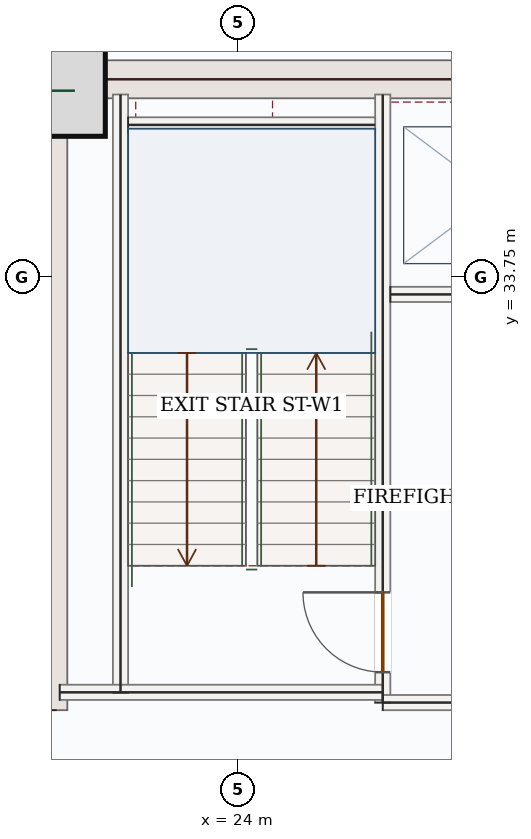
"""IFC4 building model, lengths in metres.
Left out: names, types, materials, properties, quantities, classifications, styles, units other than length and angle.
Written with IfcOpenShell. Run it as: python <this file> out.ifc"""

import sys

from ifc_helpers import new_model, si_unit, direction, frame, frame_2d, origin, origin_2d, place, context, subcontext, project, spatial, rectangle, extrude, source, transform, mapped, element, fill, save


model = new_model("IFC4")
c1 = context("Model", 3, precision=1e-05, world=origin(), true_north=direction((0.0, 1.0)))
c2 = subcontext(c1, "Body", "Model", "MODEL_VIEW")
j1 = project(units=[si_unit("LENGTHUNIT", "METRE"), si_unit("PLANEANGLEUNIT", "RADIAN")], contexts=[c1])
p1 = place(None, origin())
s1 = spatial("IfcSite", under=j1, at=p1, CompositionType="ELEMENT")
p2 = place(p1, origin())
s2 = spatial("IfcBuilding", under=s1, at=p2, CompositionType="ELEMENT")
p3 = place(p2, frame((0.0, 0.0, 159.0)))
s3 = spatial("IfcBuildingStorey", under=s2, at=p3, CompositionType="ELEMENT", Elevation=159.0)
m1 = source(origin(), c2, "Body", "SweptSolid", [
    extrude(rectangle(XDim=8.55, YDim=0.5, at=frame_2d((4.275, 0.0))), origin(), (0.0, 0.0, 1.0), 3.62),
])
p4 = place(p3, frame((21.5, 28.05, 0.0), z_axis=(0.0, 0.0, 1.0), x_axis=(0.0, 1.0, 0.0)))
e1 = element("IfcWall", 1, at=p4, inside=s3, PredefinedType="SHEAR", context=c2, shape_type="MappedRepresentation", body=[
    mapped(m1, transform((0.0, 0.0, 0.0), x_axis=(1.0, 0.0, 0.0), y_axis=(0.0, 1.0, 0.0), z_axis=(0.0, 0.0, 1.0), scale=1.0)),
])
m2 = source(origin(), c2, "Body", "SweptSolid", [
    extrude(rectangle(XDim=7.0, YDim=0.5, at=frame_2d((3.5, 0.0))), origin(), (0.0, 0.0, 1.0), 3.62),
])
p5 = place(p3, frame((21.75, 36.35, 0.0), z_axis=(0.0, 0.0, 1.0), x_axis=(1.0, 0.0, 0.0)))
e2 = element("IfcWall", 2, at=p5, inside=s3, PredefinedType="SHEAR", context=c2, shape_type="MappedRepresentation", body=[
    mapped(m2, transform((0.0, 0.0, 0.0), x_axis=(1.0, 0.0, 0.0), y_axis=(0.0, 1.0, 0.0), z_axis=(0.0, 0.0, 1.0), scale=1.0)),
])
m3 = source(origin(), c2, "Body", "SweptSolid", [
    extrude(rectangle(XDim=1.2, YDim=1.2, at=origin_2d()), origin(), (0.0, 0.0, 1.0), 3.9),
])
p6 = place(p3, frame((21.65, 36.2, 0.0), z_axis=(0.0, 0.0, 1.0), x_axis=(1.0, 0.0, 0.0)))
e3 = element("IfcColumn", 3, at=p6, inside=s3, PredefinedType="COLUMN", context=c2, shape_type="MappedRepresentation", body=[
    mapped(m3, transform((0.0, 0.0, 0.0), x_axis=(1.0, 0.0, 0.0), y_axis=(0.0, 1.0, 0.0), z_axis=(0.0, 0.0, 1.0), scale=1.0)),
])
m4 = source(origin(), c2, "Body", "SweptSolid", [
    extrude(rectangle(XDim=5.258, YDim=0.28, at=frame_2d((2.629, 0.0))), origin(), (0.0, 0.0, 1.0), 3.62),
])
p7 = place(p3, frame((18.94, 35.542, 0.0), z_axis=(0.0, 0.0, 1.0), x_axis=(0.707106781187, 0.707106781187, 0.0)))
e4 = element("IfcWall", 4, at=p7, inside=s3, PredefinedType="SOLIDWALL", context=c2, shape_type="MappedRepresentation", body=[
    mapped(m4, transform((0.0, 0.0, 0.0), x_axis=(1.0, 0.0, 0.0), y_axis=(0.0, 1.0, 0.0), z_axis=(0.0, 0.0, 1.0), scale=1.0)),
])
m5 = source(origin(), c2, "Body", "SweptSolid", [
    extrude(rectangle(XDim=7.87, YDim=0.2, at=frame_2d((3.935, 0.0))), origin(), (0.0, 0.0, 1.0), 3.62),
])
p8 = place(p3, frame((22.45, 28.28, 0.0), z_axis=(0.0, 0.0, 1.0), x_axis=(0.0, 1.0, 0.0)))
e5 = element("IfcWall", 5, at=p8, inside=s3, PredefinedType="SOLIDWALL", context=c2, shape_type="MappedRepresentation", body=[
    mapped(m5, transform((0.0, 0.0, 0.0), x_axis=(1.0, 0.0, 0.0), y_axis=(0.0, 1.0, 0.0), z_axis=(0.0, 0.0, 1.0), scale=1.0)),
])
p9 = place(p3, frame((25.9, 28.15, 0.0), z_axis=(0.0, 0.0, 1.0), x_axis=(0.0, 1.0, 0.0)))
e6 = element("IfcWall", 6, at=p9, inside=s3, PredefinedType="SOLIDWALL", context=c2, shape_type="SweptSolid", body=[
    extrude(rectangle(XDim=8.0, YDim=0.2, at=frame_2d((4.0, 0.0))), origin(), (0.0, 0.0, 1.0), 3.62),
])
p10 = place(p9, frame((0.4, 0.0, 0.0)))
e7 = element("IfcOpeningElement", 7, at=p10, cuts=e6, PredefinedType="OPENING", context=c2, shape_type="SweptSolid", body=[
    extrude(rectangle(XDim=1.05, YDim=2.15, at=frame_2d((0.525, 1.075))), frame((0.0, 0.11, 0.0), z_axis=(0.0, -1.0, 0.0), x_axis=(1.0, 0.0, 0.0)), (0.0, 0.0, 1.0), 0.22),
])
m6 = source(origin(), c2, "Body", "SweptSolid", [
    extrude(rectangle(XDim=4.25, YDim=0.2, at=frame_2d((2.125, 0.0))), origin(), (0.0, 0.0, 1.0), 3.62),
])
p11 = place(p3, frame((21.65, 28.285, 0.0), z_axis=(0.0, 0.0, 1.0), x_axis=(1.0, 0.0, 0.0)))
e8 = element("IfcWall", 8, at=p11, inside=s3, PredefinedType="SOLIDWALL", context=c2, shape_type="MappedRepresentation", body=[
    mapped(m6, transform((0.0, 0.0, 0.0), x_axis=(1.0, 0.0, 0.0), y_axis=(0.0, 1.0, 0.0), z_axis=(0.0, 0.0, 1.0), scale=1.0)),
])
m7 = source(origin(), c2, "Body", "SweptSolid", [
    extrude(rectangle(XDim=3.0, YDim=0.2, at=frame_2d((1.5, 0.0))), origin(), (0.0, 0.0, 1.0), 3.62),
])
p12 = place(p3, frame((25.9, 28.15, 0.0), z_axis=(0.0, 0.0, 1.0), x_axis=(1.0, 0.0, 0.0)))
e9 = element("IfcWall", 9, at=p12, inside=s3, PredefinedType="SOLIDWALL", context=c2, shape_type="MappedRepresentation", body=[
    mapped(m7, transform((0.0, 0.0, 0.0), x_axis=(1.0, 0.0, 0.0), y_axis=(0.0, 1.0, 0.0), z_axis=(0.0, 0.0, 1.0), scale=1.0)),
])
m8 = source(origin(), c2, "Body", "SweptSolid", [
    extrude(rectangle(XDim=3.25, YDim=0.2, at=frame_2d((1.625, 0.0))), origin(), (0.0, 0.0, 1.0), 3.62),
])
p13 = place(p3, frame((22.55, 35.75, 0.0), z_axis=(0.0, 0.0, 1.0), x_axis=(1.0, 0.0, 0.0)))
e10 = element("IfcWall", 10, at=p13, inside=s3, PredefinedType="SOLIDWALL", context=c2, shape_type="MappedRepresentation", body=[
    mapped(m8, transform((0.0, 0.0, 0.0), x_axis=(1.0, 0.0, 0.0), y_axis=(0.0, 1.0, 0.0), z_axis=(0.0, 0.0, 1.0), scale=1.0)),
])
p14 = place(p3, frame((26.0, 33.52, 0.0), z_axis=(0.0, 0.0, 1.0), x_axis=(1.0, 0.0, 0.0)))
e11 = element("IfcWall", 11, at=p14, inside=s3, PredefinedType="SOLIDWALL", context=c2, shape_type="SweptSolid", body=[
    extrude(rectangle(XDim=2.75, YDim=0.2, at=frame_2d((1.375, 0.0))), origin(), (0.0, 0.0, 1.0), 3.62),
])
p15 = place(p14, frame((0.82, 0.0, 0.0)))
e12 = element("IfcOpeningElement", 12, at=p15, cuts=e11, PredefinedType="OPENING", context=c2, shape_type="SweptSolid", body=[
    extrude(rectangle(XDim=1.1, YDim=2.15, at=frame_2d((0.55, 1.075))), frame((0.0, 0.11, 0.0), z_axis=(0.0, -1.0, 0.0), x_axis=(1.0, 0.0, 0.0)), (0.0, 0.0, 1.0), 0.22),
])
m9 = source(origin(), c2, "Body", "SweptSolid", [
    extrude(rectangle(XDim=1.05, YDim=2.15, at=frame_2d((0.525, 1.075))), frame((0.0, 0.025, 0.0), z_axis=(0.0, -1.0, 0.0), x_axis=(1.0, 0.0, 0.0)), (0.0, 0.0, 1.0), 0.05),
])
p16 = place(p10, origin())
e13 = element("IfcDoor", 13, at=p16, inside=s3, OperationType="SINGLE_SWING_RIGHT", PredefinedType="DOOR", context=c2, shape_type="MappedRepresentation", body=[
    mapped(m9, transform((0.0, 0.0, 0.0), x_axis=(1.0, 0.0, 0.0), y_axis=(0.0, 1.0, 0.0), z_axis=(0.0, 0.0, 1.0), scale=1.0)),
])
fill(e7, e13)
save(model, sys.argv[1])
